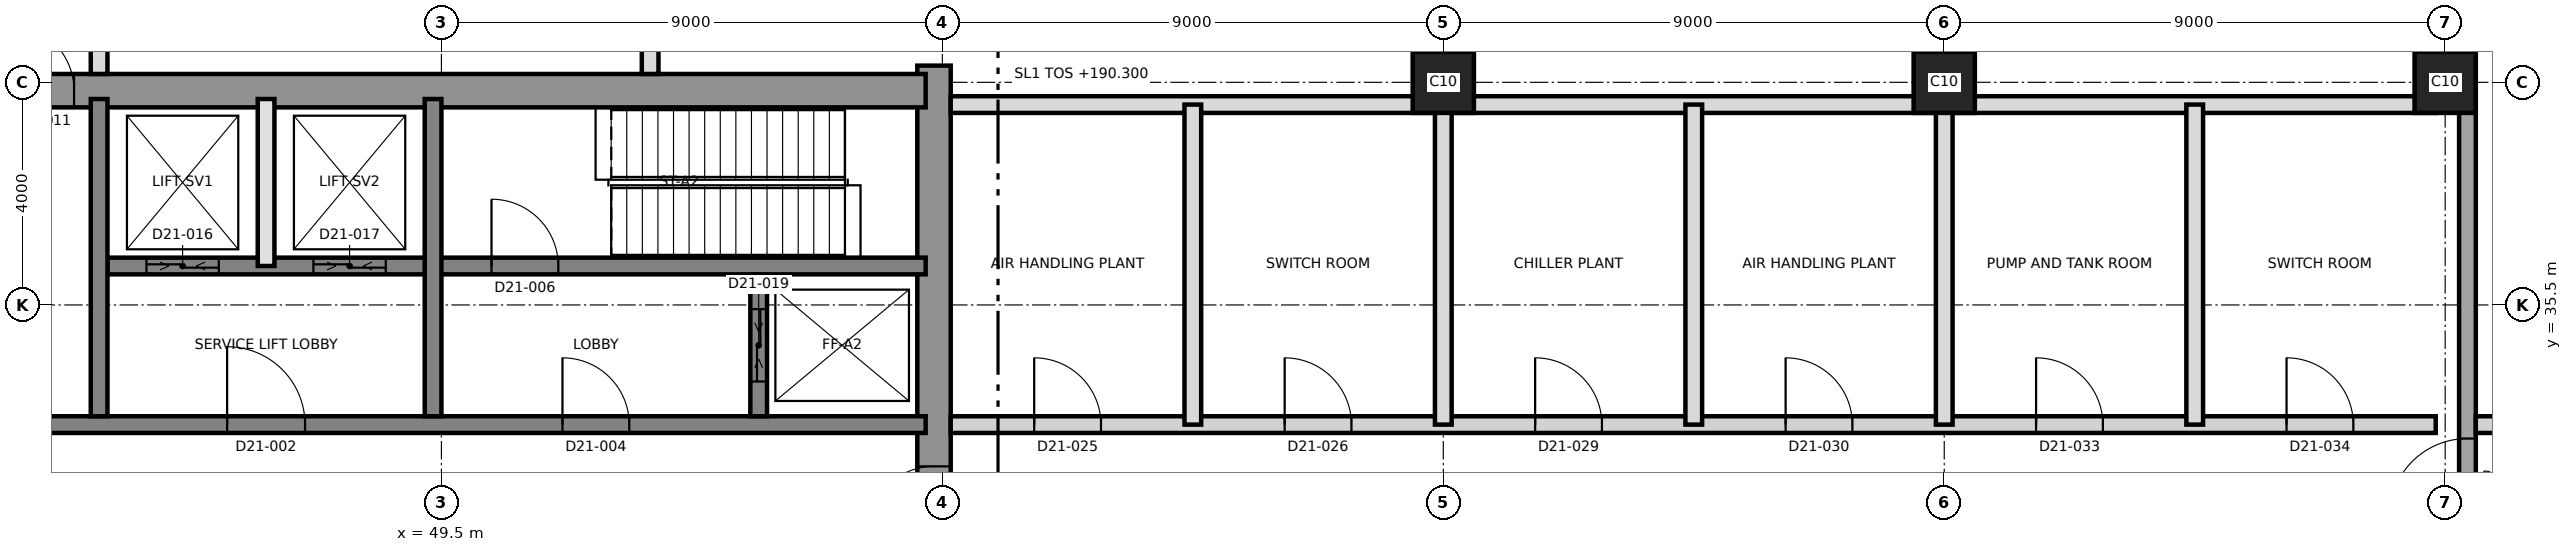
"""IFC4 building model, lengths in metres.
Left out: names, types, materials, properties, quantities, classifications, styles, units other than length and angle.
Written with IfcOpenShell. Run it as: python <this file> out.ifc"""

import sys

from ifc_helpers import new_model, si_unit, direction, frame, frame_2d, origin, origin_2d, place, context, subcontext, project, spatial, rectangle, extrude, element, fill, save


model = new_model("IFC4")
c1 = context("Model", 3, precision=1e-05, world=origin(), true_north=direction((0.0, 1.0)))
c2 = subcontext(c1, "Body", "Model", "MODEL_VIEW")
j1 = project(units=[si_unit("LENGTHUNIT", "METRE"), si_unit("PLANEANGLEUNIT", "RADIAN")], contexts=[c1])
p1 = place(None, origin())
s1 = spatial("IfcSite", under=j1, at=p1, CompositionType="ELEMENT")
p2 = place(p1, origin())
s2 = spatial("IfcBuilding", under=s1, at=p2, CompositionType="ELEMENT")
p3 = place(p2, frame((0.0, 0.0, 190.3)))
s3 = spatial("IfcBuildingStorey", under=s2, at=p3, CompositionType="ELEMENT", Elevation=190.3)
p4 = place(p3, frame((58.35, 21.2, 0.0), z_axis=(0.0, 0.0, 1.0), x_axis=(0.0, 1.0, 0.0)))
e1 = element("IfcWall", 1, at=p4, inside=s3, PredefinedType="SHEAR", context=c2, shape_type="SweptSolid", body=[
    extrude(rectangle(XDim=18.6, YDim=0.6, at=frame_2d((9.3, 0.0))), origin(), (0.0, 0.0, 1.0), 5.5),
])
p5 = place(p4, frame((10.2, 0.0, 0.0)))
e2 = element("IfcOpeningElement", 2, at=p5, cuts=e1, PredefinedType="OPENING", context=c2, shape_type="SweptSolid", body=[
    extrude(rectangle(XDim=1.2, YDim=2.1, at=frame_2d((0.6, 1.05))), frame((0.0, 0.31, 0.0), z_axis=(0.0, -1.0, 0.0), x_axis=(1.0, 0.0, 0.0)), (0.0, 0.0, 1.0), 0.62),
])
p6 = place(p3, frame((31.2, 39.35, 0.0), z_axis=(0.0, 0.0, 1.0), x_axis=(1.0, 0.0, 0.0)))
e3 = element("IfcWall", 3, at=p6, inside=s3, PredefinedType="SHEAR", context=c2, shape_type="SweptSolid", body=[
    extrude(rectangle(XDim=27.0, YDim=0.6, at=frame_2d((13.5, 0.0))), origin(), (0.0, 0.0, 1.0), 5.5),
])
p7 = place(p6, frame((10.5, 0.0, 0.0)))
e4 = element("IfcOpeningElement", 4, at=p7, cuts=e3, PredefinedType="OPENING", context=c2, shape_type="SweptSolid", body=[
    extrude(rectangle(XDim=1.2, YDim=2.1, at=frame_2d((0.6, 1.05))), frame((0.0, 0.31, 0.0), z_axis=(0.0, -1.0, 0.0), x_axis=(1.0, 0.0, 0.0)), (0.0, 0.0, 1.0), 0.62),
])
p8 = place(p3, frame((31.8, 33.35, 0.0), z_axis=(0.0, 0.0, 1.0), x_axis=(1.0, 0.0, 0.0)))
e5 = element("IfcWall", 5, at=p8, inside=s3, PredefinedType="SHEAR", context=c2, shape_type="SweptSolid", body=[
    extrude(rectangle(XDim=26.4, YDim=0.3, at=frame_2d((13.2, 0.0))), origin(), (0.0, 0.0, 1.0), 5.5),
])
p9 = place(p8, frame((13.85, 0.0, 0.0)))
e6 = element("IfcOpeningElement", 6, at=p9, cuts=e5, PredefinedType="OPENING", context=c2, shape_type="SweptSolid", body=[
    extrude(rectangle(XDim=1.4, YDim=2.1, at=frame_2d((0.7, 1.05))), frame((0.0, 0.16, 0.0), z_axis=(0.0, -1.0, 0.0), x_axis=(1.0, 0.0, 0.0)), (0.0, 0.0, 1.0), 0.32),
])
p10 = place(p8, frame((5.325, 0.0, 0.0)))
e7 = element("IfcOpeningElement", 7, at=p10, cuts=e5, PredefinedType="OPENING", context=c2, shape_type="SweptSolid", body=[
    extrude(rectangle(XDim=1.2, YDim=2.1, at=frame_2d((0.6, 1.05))), frame((0.0, 0.16, 0.0), z_axis=(0.0, -1.0, 0.0), x_axis=(1.0, 0.0, 0.0)), (0.0, 0.0, 1.0), 0.32),
])
p11 = place(p8, frame((19.875, 0.0, 0.0)))
e8 = element("IfcOpeningElement", 8, at=p11, cuts=e5, PredefinedType="OPENING", context=c2, shape_type="SweptSolid", body=[
    extrude(rectangle(XDim=1.2, YDim=2.1, at=frame_2d((0.6, 1.05))), frame((0.0, 0.16, 0.0), z_axis=(0.0, -1.0, 0.0), x_axis=(1.0, 0.0, 0.0)), (0.0, 0.0, 1.0), 0.32),
])
p12 = place(p3, frame((43.5, 36.2, 0.0), z_axis=(0.0, 0.0, 1.0), x_axis=(1.0, 0.0, 0.0)))
e9 = element("IfcWall", 9, at=p12, inside=s3, PredefinedType="SHEAR", context=c2, shape_type="SweptSolid", body=[
    extrude(rectangle(XDim=14.7, YDim=0.3, at=frame_2d((7.35, 0.0))), origin(), (0.0, 0.0, 1.0), 5.5),
])
p13 = place(p12, frame((6.9, 0.0, 0.0)))
e10 = element("IfcOpeningElement", 10, at=p13, cuts=e9, PredefinedType="OPENING", context=c2, shape_type="SweptSolid", body=[
    extrude(rectangle(XDim=1.2, YDim=2.1, at=frame_2d((0.6, 1.05))), frame((0.0, 0.16, 0.0), z_axis=(0.0, -1.0, 0.0), x_axis=(1.0, 0.0, 0.0)), (0.0, 0.0, 1.0), 0.32),
])
p14 = place(p12, frame((0.7, 0.0, 0.0)))
e11 = element("IfcOpeningElement", 11, at=p14, cuts=e9, PredefinedType="OPENING", context=c2, shape_type="SweptSolid", body=[
    extrude(rectangle(XDim=1.3, YDim=2.4, at=frame_2d((0.65, 1.2))), frame((0.0, 0.16, 0.0), z_axis=(0.0, -1.0, 0.0), x_axis=(1.0, 0.0, 0.0)), (0.0, 0.0, 1.0), 0.32),
])
p15 = place(p12, frame((3.7, 0.0, 0.0)))
e12 = element("IfcOpeningElement", 12, at=p15, cuts=e9, PredefinedType="OPENING", context=c2, shape_type="SweptSolid", body=[
    extrude(rectangle(XDim=1.3, YDim=2.4, at=frame_2d((0.65, 1.2))), frame((0.0, 0.16, 0.0), z_axis=(0.0, -1.0, 0.0), x_axis=(1.0, 0.0, 0.0)), (0.0, 0.0, 1.0), 0.32),
])
for number, where, z_axis, x_axis in (
    (13, (43.35, 33.5, 0.0), (0.0, 0.0, 1.0), (0.0, 1.0, 0.0)),
    (14, (49.35, 33.5, 0.0), (0.0, 0.0, 1.0), (0.0, 1.0, 0.0)),
):
    element("IfcWall", number, at=place(p3, frame(where, z_axis=z_axis, x_axis=x_axis)), inside=s3, PredefinedType="SHEAR", context=c2, shape_type="SweptSolid", body=[
        extrude(rectangle(XDim=5.7, YDim=0.3, at=frame_2d((2.85, 0.0))), origin(), (0.0, 0.0, 1.0), 5.5),
    ])
p16 = place(p3, frame((55.2, 33.5, 0.0), z_axis=(0.0, 0.0, 1.0), x_axis=(0.0, 1.0, 0.0)))
e15 = element("IfcWall", 15, at=p16, inside=s3, PredefinedType="SHEAR", context=c2, shape_type="SweptSolid", body=[
    extrude(rectangle(XDim=2.55, YDim=0.3, at=frame_2d((1.275, 0.0))), origin(), (0.0, 0.0, 1.0), 5.5),
])
p17 = place(p16, frame((0.625, 0.0, 0.0)))
e16 = element("IfcOpeningElement", 16, at=p17, cuts=e15, PredefinedType="OPENING", context=c2, shape_type="SweptSolid", body=[
    extrude(rectangle(XDim=1.3, YDim=2.4, at=frame_2d((0.65, 1.2))), frame((0.0, 0.16, 0.0), z_axis=(0.0, -1.0, 0.0), x_axis=(1.0, 0.0, 0.0)), (0.0, 0.0, 1.0), 0.32),
])
for number, where, z_axis, x_axis in (
    (17, (67.5, 39.5, 0.0), (0.0, 0.0, 1.0), (1.0, 0.0, 0.0)),
    (18, (76.5, 39.5, 0.0), (0.0, 0.0, 1.0), (1.0, 0.0, 0.0)),
    (19, (85.5, 39.5, 0.0), (0.0, 0.0, 1.0), (1.0, 0.0, 0.0)),
):
    element("IfcColumn", number, at=place(p3, frame(where, z_axis=z_axis, x_axis=x_axis)), inside=s3, PredefinedType="COLUMN", context=c2, shape_type="SweptSolid", body=[
        extrude(rectangle(XDim=1.1, YDim=1.1, at=origin_2d()), origin(), (0.0, 0.0, 1.0), 5.5),
    ])
p18 = place(p3, frame((85.9, 20.35, 0.0), z_axis=(0.0, 0.0, 1.0), x_axis=(0.0, 1.0, 0.0)))
e20 = element("IfcWall", 20, at=p18, inside=s3, PredefinedType="SHEAR", context=c2, shape_type="SweptSolid", body=[
    extrude(rectangle(XDim=20.3, YDim=0.3, at=frame_2d((10.15, 0.0))), origin(), (0.0, 0.0, 1.0), 5.5),
])
p19 = place(p18, frame((11.35, 0.0, 0.0)))
e21 = element("IfcOpeningElement", 21, at=p19, cuts=e20, PredefinedType="OPENING", context=c2, shape_type="SweptSolid", body=[
    extrude(rectangle(XDim=1.4, YDim=2.1, at=frame_2d((0.7, 1.05))), frame((0.0, 0.16, 0.0), z_axis=(0.0, -1.0, 0.0), x_axis=(1.0, 0.0, 0.0)), (0.0, 0.0, 1.0), 0.32),
])
p20 = place(p3, frame((46.35, 36.2, 0.0), z_axis=(0.0, 0.0, 1.0), x_axis=(0.0, 1.0, 0.0)))
e22 = element("IfcWall", 22, at=p20, inside=s3, PredefinedType="SOLIDWALL", context=c2, shape_type="SweptSolid", body=[
    extrude(rectangle(XDim=3.0, YDim=0.3, at=frame_2d((1.5, 0.0))), origin(), (0.0, 0.0, 1.0), 5.2),
])
p21 = place(p3, frame((58.65, 33.35, 0.0), z_axis=(0.0, 0.0, 1.0), x_axis=(1.0, 0.0, 0.0)))
e23 = element("IfcWall", 23, at=p21, inside=s3, PredefinedType="PARTITIONING", context=c2, shape_type="SweptSolid", body=[
    extrude(rectangle(XDim=26.68, YDim=0.3, at=frame_2d((13.34, 0.0))), origin(), (0.0, 0.0, 1.0), 5.2),
])
p22 = place(p21, frame((1.5, 0.0, 0.0)))
e24 = element("IfcOpeningElement", 24, at=p22, cuts=e23, PredefinedType="OPENING", context=c2, shape_type="SweptSolid", body=[
    extrude(rectangle(XDim=1.2, YDim=2.1, at=frame_2d((0.6, 1.05))), frame((0.0, 0.16, 0.0), z_axis=(0.0, -1.0, 0.0), x_axis=(1.0, 0.0, 0.0)), (0.0, 0.0, 1.0), 0.32),
])
p23 = place(p21, frame((6.0, 0.0, 0.0)))
e25 = element("IfcOpeningElement", 25, at=p23, cuts=e23, PredefinedType="OPENING", context=c2, shape_type="SweptSolid", body=[
    extrude(rectangle(XDim=1.2, YDim=2.1, at=frame_2d((0.6, 1.05))), frame((0.0, 0.16, 0.0), z_axis=(0.0, -1.0, 0.0), x_axis=(1.0, 0.0, 0.0)), (0.0, 0.0, 1.0), 0.32),
])
p24 = place(p21, frame((10.5, 0.0, 0.0)))
e26 = element("IfcOpeningElement", 26, at=p24, cuts=e23, PredefinedType="OPENING", context=c2, shape_type="SweptSolid", body=[
    extrude(rectangle(XDim=1.2, YDim=2.1, at=frame_2d((0.6, 1.05))), frame((0.0, 0.16, 0.0), z_axis=(0.0, -1.0, 0.0), x_axis=(1.0, 0.0, 0.0)), (0.0, 0.0, 1.0), 0.32),
])
p25 = place(p21, frame((15.0, 0.0, 0.0)))
e27 = element("IfcOpeningElement", 27, at=p25, cuts=e23, PredefinedType="OPENING", context=c2, shape_type="SweptSolid", body=[
    extrude(rectangle(XDim=1.2, YDim=2.1, at=frame_2d((0.6, 1.05))), frame((0.0, 0.16, 0.0), z_axis=(0.0, -1.0, 0.0), x_axis=(1.0, 0.0, 0.0)), (0.0, 0.0, 1.0), 0.32),
])
p26 = place(p21, frame((19.5, 0.0, 0.0)))
e28 = element("IfcOpeningElement", 28, at=p26, cuts=e23, PredefinedType="OPENING", context=c2, shape_type="SweptSolid", body=[
    extrude(rectangle(XDim=1.2, YDim=2.1, at=frame_2d((0.6, 1.05))), frame((0.0, 0.16, 0.0), z_axis=(0.0, -1.0, 0.0), x_axis=(1.0, 0.0, 0.0)), (0.0, 0.0, 1.0), 0.32),
])
p27 = place(p21, frame((24.0, 0.0, 0.0)))
e29 = element("IfcOpeningElement", 29, at=p27, cuts=e23, PredefinedType="OPENING", context=c2, shape_type="SweptSolid", body=[
    extrude(rectangle(XDim=1.2, YDim=2.1, at=frame_2d((0.6, 1.05))), frame((0.0, 0.16, 0.0), z_axis=(0.0, -1.0, 0.0), x_axis=(1.0, 0.0, 0.0)), (0.0, 0.0, 1.0), 0.32),
])
p28 = place(p3, frame((86.05, 33.35, 0.0), z_axis=(0.0, 0.0, 1.0), x_axis=(1.0, 0.0, 0.0)))
e30 = element("IfcWall", 30, at=p28, inside=s3, PredefinedType="PARTITIONING", context=c2, shape_type="SweptSolid", body=[
    extrude(rectangle(XDim=9.325, YDim=0.3, at=frame_2d((4.663, 0.0))), origin(), (0.0, 0.0, 1.0), 5.2),
])
p29 = place(p28, frame((2.35, 0.0, 0.0)))
e31 = element("IfcOpeningElement", 31, at=p29, cuts=e30, PredefinedType="OPENING", context=c2, shape_type="SweptSolid", body=[
    extrude(rectangle(XDim=1.2, YDim=2.1, at=frame_2d((0.6, 1.05))), frame((0.0, 0.16, 0.0), z_axis=(0.0, -1.0, 0.0), x_axis=(1.0, 0.0, 0.0)), (0.0, 0.0, 1.0), 0.32),
])
p30 = place(p3, frame((58.65, 39.1, 0.0), z_axis=(0.0, 0.0, 1.0), x_axis=(1.0, 0.0, 0.0)))
e32 = element("IfcWall", 32, at=p30, inside=s3, PredefinedType="PARTITIONING", context=c2, shape_type="SweptSolid", body=[
    extrude(rectangle(XDim=26.68, YDim=0.3, at=frame_2d((13.34, 0.0))), origin(), (0.0, 0.0, 1.0), 5.2),
])
p31 = place(p3, frame((43.35, 39.65, 0.0), z_axis=(0.0, 0.0, 1.0), x_axis=(0.0, 1.0, 0.0)))
e33 = element("IfcWall", 33, at=p31, inside=s3, PredefinedType="PARTITIONING", context=c2, shape_type="SweptSolid", body=[
    extrude(rectangle(XDim=18.63, YDim=0.3, at=frame_2d((9.315, 0.0))), origin(), (0.0, 0.0, 1.0), 5.2),
])
p32 = place(p31, frame((1.5, 0.0, 0.0)))
e34 = element("IfcOpeningElement", 34, at=p32, cuts=e33, PredefinedType="OPENING", context=c2, shape_type="SweptSolid", body=[
    extrude(rectangle(XDim=1.2, YDim=2.1, at=frame_2d((0.6, 1.05))), frame((0.0, 0.16, 0.0), z_axis=(0.0, -1.0, 0.0), x_axis=(1.0, 0.0, 0.0)), (0.0, 0.0, 1.0), 0.32),
])
p33 = place(p31, frame((6.0, 0.0, 0.0)))
e35 = element("IfcOpeningElement", 35, at=p33, cuts=e33, PredefinedType="OPENING", context=c2, shape_type="SweptSolid", body=[
    extrude(rectangle(XDim=1.2, YDim=2.1, at=frame_2d((0.6, 1.05))), frame((0.0, 0.16, 0.0), z_axis=(0.0, -1.0, 0.0), x_axis=(1.0, 0.0, 0.0)), (0.0, 0.0, 1.0), 0.32),
])
p34 = place(p31, frame((10.5, 0.0, 0.0)))
e36 = element("IfcOpeningElement", 36, at=p34, cuts=e33, PredefinedType="OPENING", context=c2, shape_type="SweptSolid", body=[
    extrude(rectangle(XDim=1.2, YDim=2.1, at=frame_2d((0.6, 1.05))), frame((0.0, 0.16, 0.0), z_axis=(0.0, -1.0, 0.0), x_axis=(1.0, 0.0, 0.0)), (0.0, 0.0, 1.0), 0.32),
])
p35 = place(p31, frame((15.0, 0.0, 0.0)))
e37 = element("IfcOpeningElement", 37, at=p35, cuts=e33, PredefinedType="OPENING", context=c2, shape_type="SweptSolid", body=[
    extrude(rectangle(XDim=1.2, YDim=2.1, at=frame_2d((0.6, 1.05))), frame((0.0, 0.16, 0.0), z_axis=(0.0, -1.0, 0.0), x_axis=(1.0, 0.0, 0.0)), (0.0, 0.0, 1.0), 0.32),
])
p36 = place(p3, frame((53.25, 39.65, 0.0), z_axis=(0.0, 0.0, 1.0), x_axis=(0.0, 1.0, 0.0)))
e38 = element("IfcWall", 38, at=p36, inside=s3, PredefinedType="PARTITIONING", context=c2, shape_type="SweptSolid", body=[
    extrude(rectangle(XDim=1.624, YDim=0.3, at=frame_2d((0.812, 0.0))), origin(), (0.0, 0.0, 1.0), 5.2),
])
for number, where, z_axis, x_axis in (
    (39, (63.0, 33.35, 0.0), (0.0, 0.0, 1.0), (0.0, 1.0, 0.0)),
    (40, (67.5, 33.35, 0.0), (0.0, 0.0, 1.0), (0.0, 1.0, 0.0)),
    (41, (72.0, 33.35, 0.0), (0.0, 0.0, 1.0), (0.0, 1.0, 0.0)),
    (42, (76.5, 33.35, 0.0), (0.0, 0.0, 1.0), (0.0, 1.0, 0.0)),
    (43, (81.0, 33.35, 0.0), (0.0, 0.0, 1.0), (0.0, 1.0, 0.0)),
):
    element("IfcWall", number, at=place(p3, frame(where, z_axis=z_axis, x_axis=x_axis)), inside=s3, PredefinedType="PARTITIONING", context=c2, shape_type="SweptSolid", body=[
        extrude(rectangle(XDim=5.75, YDim=0.3, at=frame_2d((2.875, 0.0))), origin(), (0.0, 0.0, 1.0), 5.2),
    ])
p37 = place(p9, origin())
e44 = element("IfcDoor", 44, at=p37, inside=s3, OperationType="SINGLE_SWING_RIGHT", PredefinedType="DOOR", context=c2, shape_type="SweptSolid", body=[
    extrude(rectangle(XDim=1.4, YDim=2.1, at=frame_2d((0.7, 1.05))), frame((0.0, 0.025, 0.0), z_axis=(0.0, -1.0, 0.0), x_axis=(1.0, 0.0, 0.0)), (0.0, 0.0, 1.0), 0.05),
])
fill(e6, e44)
p38 = place(p11, origin())
e45 = element("IfcDoor", 45, at=p38, inside=s3, OperationType="SINGLE_SWING_RIGHT", PredefinedType="DOOR", context=c2, shape_type="SweptSolid", body=[
    extrude(rectangle(XDim=1.2, YDim=2.1, at=frame_2d((0.6, 1.05))), frame((0.0, 0.025, 0.0), z_axis=(0.0, -1.0, 0.0), x_axis=(1.0, 0.0, 0.0)), (0.0, 0.0, 1.0), 0.05),
])
fill(e8, e45)
p39 = place(p13, origin())
e46 = element("IfcDoor", 46, at=p39, inside=s3, OperationType="SINGLE_SWING_LEFT", PredefinedType="DOOR", context=c2, shape_type="SweptSolid", body=[
    extrude(rectangle(XDim=1.2, YDim=2.1, at=frame_2d((0.6, 1.05))), frame((0.0, 0.025, 0.0), z_axis=(0.0, -1.0, 0.0), x_axis=(1.0, 0.0, 0.0)), (0.0, 0.0, 1.0), 0.05),
])
fill(e10, e46)
p40 = place(p5, origin())
e47 = element("IfcDoor", 47, at=p40, inside=s3, OperationType="SINGLE_SWING_LEFT", PredefinedType="DOOR", context=c2, shape_type="SweptSolid", body=[
    extrude(rectangle(XDim=1.2, YDim=2.1, at=frame_2d((0.6, 1.05))), frame((0.0, 0.025, 0.0), z_axis=(0.0, -1.0, 0.0), x_axis=(1.0, 0.0, 0.0)), (0.0, 0.0, 1.0), 0.05),
])
fill(e2, e47)
p41 = place(p7, origin())
e48 = element("IfcDoor", 48, at=p41, inside=s3, OperationType="SINGLE_SWING_RIGHT", PredefinedType="DOOR", context=c2, shape_type="SweptSolid", body=[
    extrude(rectangle(XDim=1.2, YDim=2.1, at=frame_2d((0.6, 1.05))), frame((0.0, 0.025, 0.0), z_axis=(0.0, -1.0, 0.0), x_axis=(1.0, 0.0, 0.0)), (0.0, 0.0, 1.0), 0.05),
])
fill(e4, e48)
p42 = place(p14, origin())
e49 = element("IfcDoor", 49, at=p42, inside=s3, OperationType="SLIDING_TO_LEFT", PredefinedType="DOOR", context=c2, shape_type="SweptSolid", body=[
    extrude(rectangle(XDim=1.3, YDim=2.4, at=frame_2d((0.65, 1.2))), frame((0.0, 0.025, 0.0), z_axis=(0.0, -1.0, 0.0), x_axis=(1.0, 0.0, 0.0)), (0.0, 0.0, 1.0), 0.05),
])
fill(e11, e49)
p43 = place(p15, origin())
e50 = element("IfcDoor", 50, at=p43, inside=s3, OperationType="SLIDING_TO_LEFT", PredefinedType="DOOR", context=c2, shape_type="SweptSolid", body=[
    extrude(rectangle(XDim=1.3, YDim=2.4, at=frame_2d((0.65, 1.2))), frame((0.0, 0.025, 0.0), z_axis=(0.0, -1.0, 0.0), x_axis=(1.0, 0.0, 0.0)), (0.0, 0.0, 1.0), 0.05),
])
fill(e12, e50)
p44 = place(p17, origin())
e51 = element("IfcDoor", 51, at=p44, inside=s3, OperationType="SLIDING_TO_LEFT", PredefinedType="DOOR", context=c2, shape_type="SweptSolid", body=[
    extrude(rectangle(XDim=1.3, YDim=2.4, at=frame_2d((0.65, 1.2))), frame((0.0, 0.025, 0.0), z_axis=(0.0, -1.0, 0.0), x_axis=(1.0, 0.0, 0.0)), (0.0, 0.0, 1.0), 0.05),
])
fill(e16, e51)
p45 = place(p22, origin())
e52 = element("IfcDoor", 52, at=p45, inside=s3, OperationType="SINGLE_SWING_LEFT", PredefinedType="DOOR", context=c2, shape_type="SweptSolid", body=[
    extrude(rectangle(XDim=1.2, YDim=2.1, at=frame_2d((0.6, 1.05))), frame((0.0, 0.025, 0.0), z_axis=(0.0, -1.0, 0.0), x_axis=(1.0, 0.0, 0.0)), (0.0, 0.0, 1.0), 0.05),
])
fill(e24, e52)
p46 = place(p23, origin())
e53 = element("IfcDoor", 53, at=p46, inside=s3, OperationType="SINGLE_SWING_LEFT", PredefinedType="DOOR", context=c2, shape_type="SweptSolid", body=[
    extrude(rectangle(XDim=1.2, YDim=2.1, at=frame_2d((0.6, 1.05))), frame((0.0, 0.025, 0.0), z_axis=(0.0, -1.0, 0.0), x_axis=(1.0, 0.0, 0.0)), (0.0, 0.0, 1.0), 0.05),
])
fill(e25, e53)
p47 = place(p24, origin())
e54 = element("IfcDoor", 54, at=p47, inside=s3, OperationType="SINGLE_SWING_LEFT", PredefinedType="DOOR", context=c2, shape_type="SweptSolid", body=[
    extrude(rectangle(XDim=1.2, YDim=2.1, at=frame_2d((0.6, 1.05))), frame((0.0, 0.025, 0.0), z_axis=(0.0, -1.0, 0.0), x_axis=(1.0, 0.0, 0.0)), (0.0, 0.0, 1.0), 0.05),
])
fill(e26, e54)
p48 = place(p25, origin())
e55 = element("IfcDoor", 55, at=p48, inside=s3, OperationType="SINGLE_SWING_RIGHT", PredefinedType="DOOR", context=c2, shape_type="SweptSolid", body=[
    extrude(rectangle(XDim=1.2, YDim=2.1, at=frame_2d((0.6, 1.05))), frame((0.0, 0.025, 0.0), z_axis=(0.0, -1.0, 0.0), x_axis=(1.0, 0.0, 0.0)), (0.0, 0.0, 1.0), 0.05),
])
fill(e27, e55)
p49 = place(p26, origin())
e56 = element("IfcDoor", 56, at=p49, inside=s3, OperationType="SINGLE_SWING_RIGHT", PredefinedType="DOOR", context=c2, shape_type="SweptSolid", body=[
    extrude(rectangle(XDim=1.2, YDim=2.1, at=frame_2d((0.6, 1.05))), frame((0.0, 0.025, 0.0), z_axis=(0.0, -1.0, 0.0), x_axis=(1.0, 0.0, 0.0)), (0.0, 0.0, 1.0), 0.05),
])
fill(e28, e56)
p50 = place(p27, origin())
e57 = element("IfcDoor", 57, at=p50, inside=s3, OperationType="SINGLE_SWING_LEFT", PredefinedType="DOOR", context=c2, shape_type="SweptSolid", body=[
    extrude(rectangle(XDim=1.2, YDim=2.1, at=frame_2d((0.6, 1.05))), frame((0.0, 0.025, 0.0), z_axis=(0.0, -1.0, 0.0), x_axis=(1.0, 0.0, 0.0)), (0.0, 0.0, 1.0), 0.05),
])
fill(e29, e57)
p51 = place(p19, origin())
e58 = element("IfcDoor", 58, at=p51, inside=s3, OperationType="SINGLE_SWING_RIGHT", PredefinedType="DOOR", context=c2, shape_type="SweptSolid", body=[
    extrude(rectangle(XDim=1.4, YDim=2.1, at=frame_2d((0.7, 1.05))), frame((0.0, 0.025, 0.0), z_axis=(0.0, -1.0, 0.0), x_axis=(1.0, 0.0, 0.0)), (0.0, 0.0, 1.0), 0.05),
])
fill(e21, e58)
save(model, sys.argv[1])
